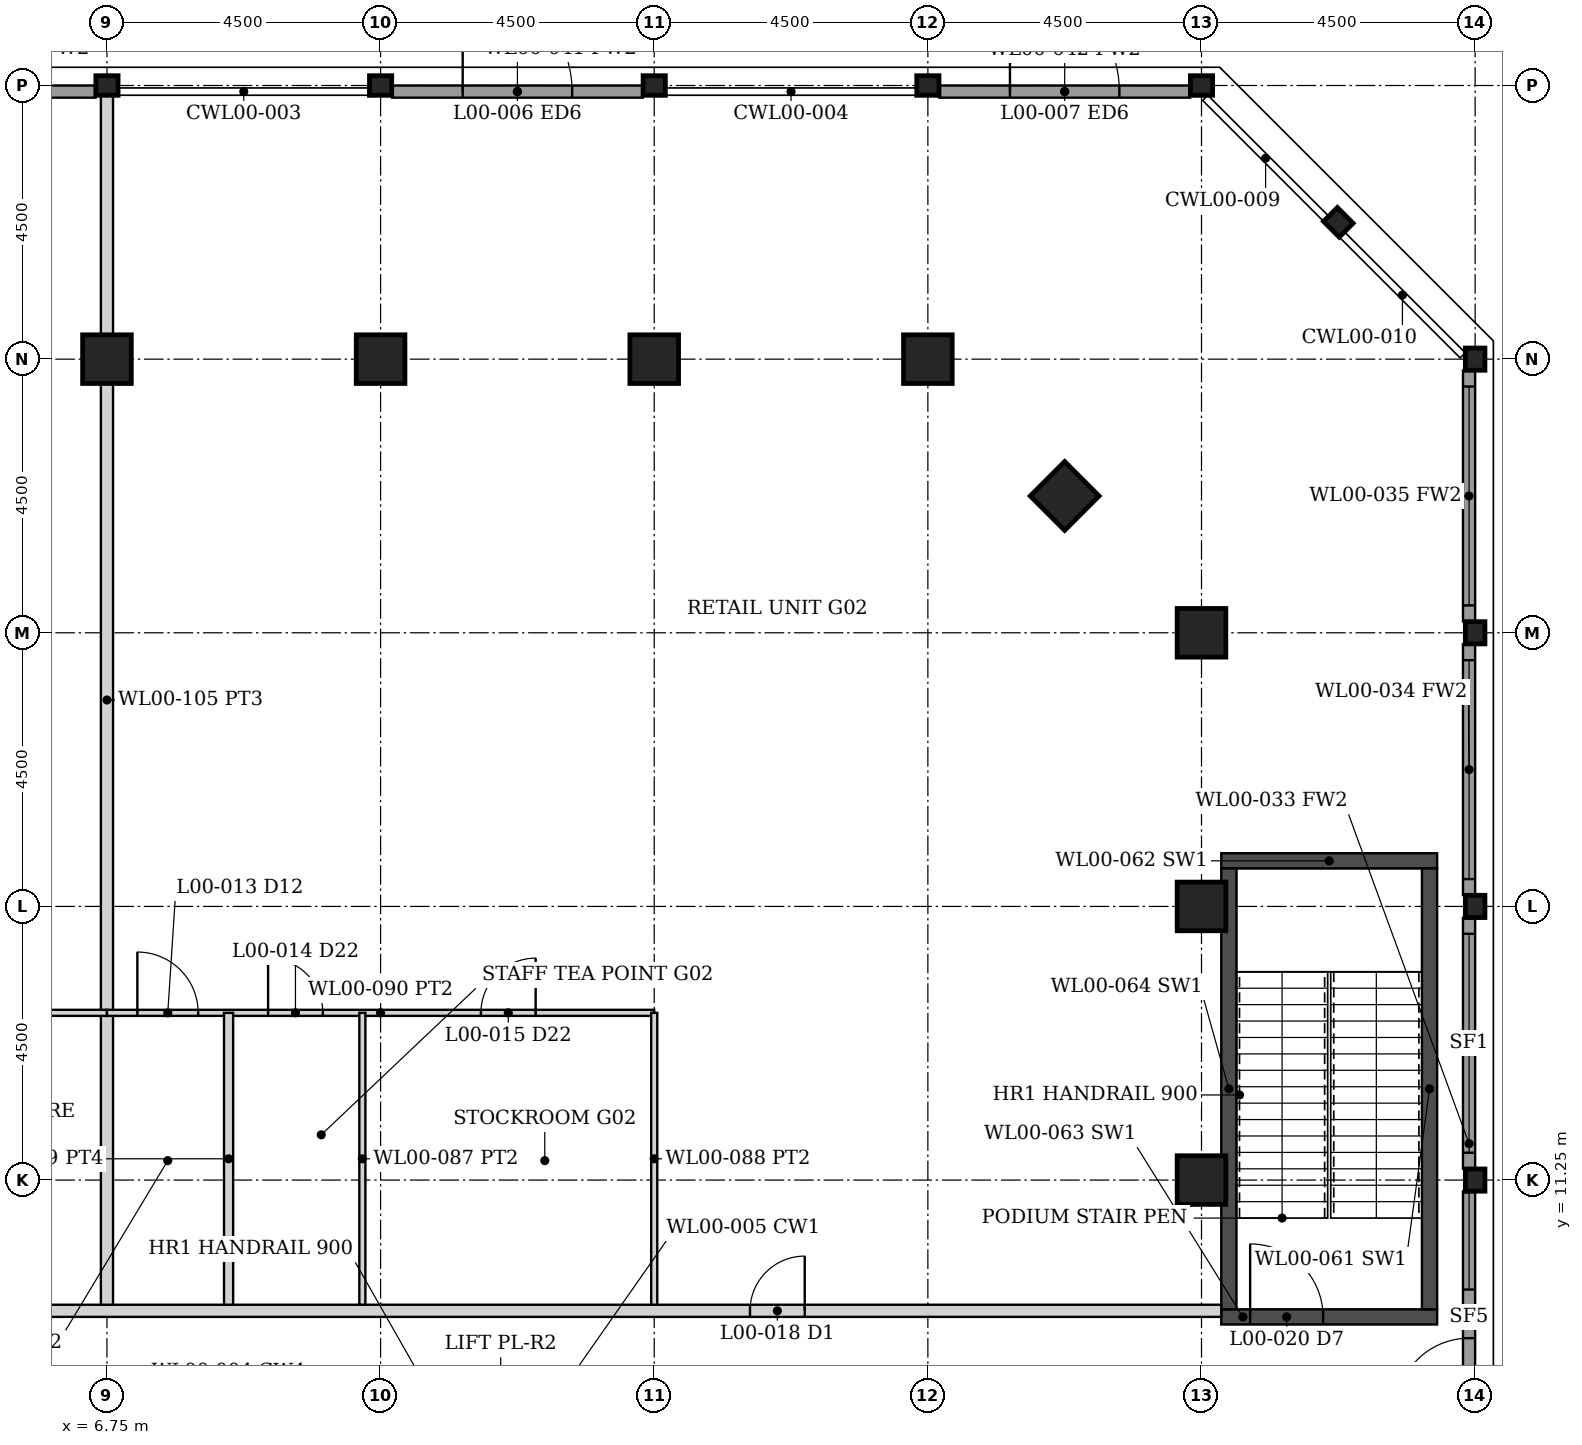
"""IFC4 building model, lengths in metres.
Left out: names, types, materials, properties, quantities, classifications, styles, units other than length and angle.
Written with IfcOpenShell. Run it as: python <this file> out.ifc"""

import sys

from ifc_helpers import new_model, si_unit, direction, frame, frame_2d, origin, origin_2d, place, context, subcontext, project, spatial, rectangle, hollow_rectangle, i_section, extrude, element, fill, save


model = new_model("IFC4")
c1 = context("Model", 3, precision=1e-05, world=origin(), true_north=direction((0.0, 1.0)))
c2 = subcontext(c1, "Body", "Model", "MODEL_VIEW")
j1 = project(units=[si_unit("LENGTHUNIT", "METRE"), si_unit("PLANEANGLEUNIT", "RADIAN")], contexts=[c1])
p1 = place(None, origin())
s1 = spatial("IfcSite", under=j1, at=p1, CompositionType="ELEMENT")
p2 = place(p1, origin())
s2 = spatial("IfcBuilding", under=s1, at=p2, CompositionType="ELEMENT")
p3 = place(p2, origin())
s3 = spatial("IfcBuildingStorey", under=s2, at=p3, CompositionType="ELEMENT", Elevation=0.0)
for number, where, z_axis, x_axis in (
    (1, (6.75, 24.75, -0.3), (0.0, 0.0, 1.0), (0.0, 1.0, 0.0)),
    (2, (11.25, 24.75, -0.3), (0.0, 0.0, 1.0), (0.0, 1.0, 0.0)),
    (3, (24.75, 11.25, -0.3), (0.0, 0.0, 1.0), (1.0, 0.0, 0.0)),
    (4, (15.75, 24.75, -0.3), (0.0, 0.0, 1.0), (0.0, 1.0, 0.0)),
    (5, (24.75, 15.75, -0.3), (0.0, 0.0, 1.0), (1.0, 0.0, 0.0)),
    (6, (20.25, 24.75, -0.3), (0.0, 0.0, 1.0), (0.0, 1.0, 0.0)),
    (7, (24.75, 20.25, -0.3), (0.0, 0.0, 1.0), (1.0, 0.0, 0.0)),
    (8, (22.5, 22.5, -0.3), (0.0, 0.0, 1.0), (0.707, 0.707, 0.0)),
):
    element("IfcColumn", number, at=place(p3, frame(where, z_axis=z_axis, x_axis=x_axis)), inside=s3, PredefinedType="COLUMN", context=c2, shape_type="SweptSolid", body=[
        extrude(hollow_rectangle(XDim=0.8, YDim=0.8, WallThickness=0.08, at=origin_2d()), origin(), (0.0, 0.0, 1.0), 6.3),
    ])
for number, where, z_axis, x_axis in (
    (9, (6.75, 29.25, -0.3), (0.0, 0.0, 1.0), (0.0, 1.0, 0.0)),
    (10, (11.25, 29.25, -0.3), (0.0, 0.0, 1.0), (0.0, 1.0, 0.0)),
    (11, (29.25, 11.25, -0.3), (0.0, 0.0, 1.0), (1.0, 0.0, 0.0)),
    (12, (15.75, 29.25, -0.3), (0.0, 0.0, 1.0), (0.0, 1.0, 0.0)),
    (13, (29.25, 15.75, -0.3), (0.0, 0.0, 1.0), (1.0, 0.0, 0.0)),
    (14, (20.25, 29.25, -0.3), (0.0, 0.0, 1.0), (0.0, 1.0, 0.0)),
    (15, (29.25, 20.25, -0.3), (0.0, 0.0, 1.0), (1.0, 0.0, 0.0)),
    (16, (24.75, 29.25, -0.3), (0.0, 0.0, 1.0), (0.0, 1.0, 0.0)),
    (17, (29.25, 24.75, -0.3), (0.0, 0.0, 1.0), (1.0, 0.0, 0.0)),
    (18, (27.0, 27.0, -0.3), (0.0, 0.0, 1.0), (0.707, 0.707, 0.0)),
):
    element("IfcColumn", number, at=place(p3, frame(where, z_axis=z_axis, x_axis=x_axis)), inside=s3, PredefinedType="COLUMN", context=c2, shape_type="SweptSolid", body=[
        extrude(i_section(OverallWidth=0.322, OverallDepth=0.365, WebThickness=0.027, FlangeThickness=0.044, FilletRadius=0.015, at=origin_2d()), origin(), (0.0, 0.0, 1.0), 6.3),
    ])
p4 = place(p3, frame((25.075, 9.0, 0.0), z_axis=(0.0, 0.0, 1.0), x_axis=(1.0, 0.0, 0.0)))
e19 = element("IfcWall", 19, at=p4, inside=s3, PredefinedType="SHEAR", context=c2, shape_type="SweptSolid", body=[
    extrude(rectangle(XDim=3.55, YDim=0.25, at=frame_2d((1.775, 0.0))), origin(), (0.0, 0.0, 1.0), 6.0),
])
p5 = place(p4, frame((0.475, 0.0, 0.0)))
e20 = element("IfcOpeningElement", 20, at=p5, cuts=e19, PredefinedType="OPENING", context=c2, shape_type="SweptSolid", body=[
    extrude(rectangle(XDim=1.2, YDim=2.1, at=frame_2d((0.6, 1.05))), frame((0.0, 0.135, 0.0), z_axis=(0.0, -1.0, 0.0), x_axis=(1.0, 0.0, 0.0)), (0.0, 0.0, 1.0), 0.27),
])
p6 = place(p3, frame((25.075, 16.5, 0.0), z_axis=(0.0, 0.0, 1.0), x_axis=(1.0, 0.0, 0.0)))
e21 = element("IfcWall", 21, at=p6, inside=s3, PredefinedType="SHEAR", context=c2, shape_type="SweptSolid", body=[
    extrude(rectangle(XDim=3.55, YDim=0.25, at=frame_2d((1.775, 0.0))), origin(), (0.0, 0.0, 1.0), 6.0),
])
for number, where, z_axis, x_axis in (
    (22, (25.2, 9.125, 0.0), (0.0, 0.0, 1.0), (0.0, 1.0, 0.0)),
    (23, (28.5, 9.125, 0.0), (0.0, 0.0, 1.0), (0.0, 1.0, 0.0)),
):
    element("IfcWall", number, at=place(p3, frame(where, z_axis=z_axis, x_axis=x_axis)), inside=s3, PredefinedType="SHEAR", context=c2, shape_type="SweptSolid", body=[
        extrude(rectangle(XDim=7.25, YDim=0.25, at=frame_2d((3.625, 0.0))), origin(), (0.0, 0.0, 1.0), 6.0),
    ])
p7 = place(p3, frame((29.15, 6.938, 0.0), z_axis=(0.0, 0.0, 1.0), x_axis=(0.0, 1.0, 0.0)))
e24 = element("IfcWall", 24, at=p7, inside=s3, PredefinedType="SOLIDWALL", context=c2, shape_type="SweptSolid", body=[
    extrude(rectangle(XDim=4.125, YDim=0.2, at=frame_2d((2.062, 0.0))), origin(), (0.0, 0.0, 1.0), 5.133),
])
p8 = place(p7, frame((0.512, 0.0, 0.0)))
e25 = element("IfcOpeningElement", 25, at=p8, cuts=e24, PredefinedType="OPENING", context=c2, shape_type="SweptSolid", body=[
    extrude(rectangle(XDim=1.2, YDim=2.4, at=frame_2d((0.6, 1.2))), frame((0.0, 0.11, 0.0), z_axis=(0.0, -1.0, 0.0), x_axis=(1.0, 0.0, 0.0)), (0.0, 0.0, 1.0), 0.22),
])
p9 = place(p7, frame((2.512, 0.0, 0.15)))
e26 = element("IfcOpeningElement", 26, at=p9, cuts=e24, PredefinedType="OPENING", context=c2, shape_type="SweptSolid", body=[
    extrude(rectangle(XDim=1.6, YDim=4.833, at=frame_2d((0.8, 2.417))), frame((0.0, 0.11, 0.0), z_axis=(0.0, -1.0, 0.0), x_axis=(1.0, 0.0, 0.0)), (0.0, 0.0, 1.0), 0.22),
])
p10 = place(p3, frame((29.15, 11.438, 0.0), z_axis=(0.0, 0.0, 1.0), x_axis=(0.0, 1.0, 0.0)))
e27 = element("IfcWall", 27, at=p10, inside=s3, PredefinedType="SOLIDWALL", context=c2, shape_type="SweptSolid", body=[
    extrude(rectangle(XDim=4.125, YDim=0.2, at=frame_2d((2.062, 0.0))), origin(), (0.0, 0.0, 1.0), 5.133),
])
p11 = place(p10, frame((0.262, 0.0, 0.15)))
e28 = element("IfcOpeningElement", 28, at=p11, cuts=e27, PredefinedType="OPENING", context=c2, shape_type="SweptSolid", body=[
    extrude(rectangle(XDim=3.6, YDim=4.833, at=frame_2d((1.8, 2.417))), frame((0.0, 0.11, 0.0), z_axis=(0.0, -1.0, 0.0), x_axis=(1.0, 0.0, 0.0)), (0.0, 0.0, 1.0), 0.22),
])
p12 = place(p3, frame((29.15, 15.938, 0.0), z_axis=(0.0, 0.0, 1.0), x_axis=(0.0, 1.0, 0.0)))
e29 = element("IfcWall", 29, at=p12, inside=s3, PredefinedType="SOLIDWALL", context=c2, shape_type="SweptSolid", body=[
    extrude(rectangle(XDim=4.125, YDim=0.2, at=frame_2d((2.062, 0.0))), origin(), (0.0, 0.0, 1.0), 5.133),
])
p13 = place(p12, frame((0.262, 0.0, 0.15)))
e30 = element("IfcOpeningElement", 30, at=p13, cuts=e29, PredefinedType="OPENING", context=c2, shape_type="SweptSolid", body=[
    extrude(rectangle(XDim=3.6, YDim=4.833, at=frame_2d((1.8, 2.417))), frame((0.0, 0.11, 0.0), z_axis=(0.0, -1.0, 0.0), x_axis=(1.0, 0.0, 0.0)), (0.0, 0.0, 1.0), 0.22),
])
p14 = place(p3, frame((29.15, 20.438, 0.0), z_axis=(0.0, 0.0, 1.0), x_axis=(0.0, 1.0, 0.0)))
e31 = element("IfcWall", 31, at=p14, inside=s3, PredefinedType="SOLIDWALL", context=c2, shape_type="SweptSolid", body=[
    extrude(rectangle(XDim=4.125, YDim=0.2, at=frame_2d((2.062, 0.0))), origin(), (0.0, 0.0, 1.0), 5.133),
])
p15 = place(p14, frame((0.262, 0.0, 0.15)))
e32 = element("IfcOpeningElement", 32, at=p15, cuts=e31, PredefinedType="OPENING", context=c2, shape_type="SweptSolid", body=[
    extrude(rectangle(XDim=3.6, YDim=4.833, at=frame_2d((1.8, 2.417))), frame((0.0, 0.11, 0.0), z_axis=(0.0, -1.0, 0.0), x_axis=(1.0, 0.0, 0.0)), (0.0, 0.0, 1.0), 0.22),
])
p16 = place(p3, frame((2.438, 29.15, 0.0), z_axis=(0.0, 0.0, 1.0), x_axis=(1.0, 0.0, 0.0)))
e33 = element("IfcWall", 33, at=p16, inside=s3, PredefinedType="SOLIDWALL", context=c2, shape_type="SweptSolid", body=[
    extrude(rectangle(XDim=4.125, YDim=0.2, at=frame_2d((2.062, 0.0))), origin(), (0.0, 0.0, 1.0), 5.133),
])
p17 = place(p16, frame((1.162, 0.0, 0.0)))
e34 = element("IfcOpeningElement", 34, at=p17, cuts=e33, PredefinedType="OPENING", context=c2, shape_type="SweptSolid", body=[
    extrude(rectangle(XDim=1.8, YDim=2.7, at=frame_2d((0.9, 1.35))), frame((0.0, 0.11, 0.0), z_axis=(0.0, -1.0, 0.0), x_axis=(1.0, 0.0, 0.0)), (0.0, 0.0, 1.0), 0.22),
])
p18 = place(p3, frame((11.438, 29.15, 0.0), z_axis=(0.0, 0.0, 1.0), x_axis=(1.0, 0.0, 0.0)))
e35 = element("IfcWall", 35, at=p18, inside=s3, PredefinedType="SOLIDWALL", context=c2, shape_type="SweptSolid", body=[
    extrude(rectangle(XDim=4.125, YDim=0.2, at=frame_2d((2.062, 0.0))), origin(), (0.0, 0.0, 1.0), 5.133),
])
p19 = place(p18, frame((1.162, 0.0, 0.0)))
e36 = element("IfcOpeningElement", 36, at=p19, cuts=e35, PredefinedType="OPENING", context=c2, shape_type="SweptSolid", body=[
    extrude(rectangle(XDim=1.8, YDim=2.7, at=frame_2d((0.9, 1.35))), frame((0.0, 0.11, 0.0), z_axis=(0.0, -1.0, 0.0), x_axis=(1.0, 0.0, 0.0)), (0.0, 0.0, 1.0), 0.22),
])
p20 = place(p3, frame((20.438, 29.15, 0.0), z_axis=(0.0, 0.0, 1.0), x_axis=(1.0, 0.0, 0.0)))
e37 = element("IfcWall", 37, at=p20, inside=s3, PredefinedType="SOLIDWALL", context=c2, shape_type="SweptSolid", body=[
    extrude(rectangle(XDim=4.125, YDim=0.2, at=frame_2d((2.062, 0.0))), origin(), (0.0, 0.0, 1.0), 5.133),
])
p21 = place(p20, frame((1.162, 0.0, 0.0)))
e38 = element("IfcOpeningElement", 38, at=p21, cuts=e37, PredefinedType="OPENING", context=c2, shape_type="SweptSolid", body=[
    extrude(rectangle(XDim=1.8, YDim=2.7, at=frame_2d((0.9, 1.35))), frame((0.0, 0.11, 0.0), z_axis=(0.0, -1.0, 0.0), x_axis=(1.0, 0.0, 0.0)), (0.0, 0.0, 1.0), 0.22),
])
p22 = place(p3, frame((-25.075, 9.1, 0.0), z_axis=(0.0, 0.0, 1.0), x_axis=(1.0, 0.0, 0.0)))
e39 = element("IfcWall", 39, at=p22, inside=s3, PredefinedType="PARTITIONING", context=c2, shape_type="SweptSolid", body=[
    extrude(rectangle(XDim=50.15, YDim=0.2, at=frame_2d((25.075, 0.0))), origin(), (0.0, 0.0, 1.0), 4.829),
])
p23 = place(p22, frame((6.85, 0.0, 0.0)))
e40 = element("IfcOpeningElement", 40, at=p23, cuts=e39, PredefinedType="OPENING", context=c2, shape_type="SweptSolid", body=[
    extrude(rectangle(XDim=0.9, YDim=2.1, at=frame_2d((0.45, 1.05))), frame((0.0, 0.11, 0.0), z_axis=(0.0, -1.0, 0.0), x_axis=(1.0, 0.0, 0.0)), (0.0, 0.0, 1.0), 0.22),
])
p24 = place(p22, frame((24.625, 0.0, 0.0)))
e41 = element("IfcOpeningElement", 41, at=p24, cuts=e39, PredefinedType="OPENING", context=c2, shape_type="SweptSolid", body=[
    extrude(rectangle(XDim=0.9, YDim=2.1, at=frame_2d((0.45, 1.05))), frame((0.0, 0.11, 0.0), z_axis=(0.0, -1.0, 0.0), x_axis=(1.0, 0.0, 0.0)), (0.0, 0.0, 1.0), 0.22),
])
p25 = place(p22, frame((42.4, 0.0, 0.0)))
e42 = element("IfcOpeningElement", 42, at=p25, cuts=e39, PredefinedType="OPENING", context=c2, shape_type="SweptSolid", body=[
    extrude(rectangle(XDim=0.9, YDim=2.1, at=frame_2d((0.45, 1.05))), frame((0.0, 0.11, 0.0), z_axis=(0.0, -1.0, 0.0), x_axis=(1.0, 0.0, 0.0)), (0.0, 0.0, 1.0), 0.22),
])
p26 = place(p3, frame((6.75, 9.2, 0.0), z_axis=(0.0, 0.0, 1.0), x_axis=(0.0, 1.0, 0.0)))
e43 = element("IfcWall", 43, at=p26, inside=s3, PredefinedType="PARTITIONING", context=c2, shape_type="SweptSolid", body=[
    extrude(rectangle(XDim=19.889, YDim=0.2, at=frame_2d((9.944, 0.0))), origin(), (0.0, 0.0, 1.0), 4.829),
])
p27 = place(p3, frame((2.25, 14.0, 0.0), z_axis=(0.0, 0.0, 1.0), x_axis=(1.0, 0.0, 0.0)))
e44 = element("IfcWall", 44, at=p27, inside=s3, PredefinedType="PARTITIONING", context=c2, shape_type="SweptSolid", body=[
    extrude(rectangle(XDim=4.5, YDim=0.1, at=frame_2d((2.25, 0.0))), origin(), (0.0, 0.0, 1.0), 4.829),
])
p28 = place(p27, frame((1.8, 0.0, 0.0)))
e45 = element("IfcOpeningElement", 45, at=p28, cuts=e44, PredefinedType="OPENING", context=c2, shape_type="SweptSolid", body=[
    extrude(rectangle(XDim=0.9, YDim=2.1, at=frame_2d((0.45, 1.05))), frame((0.0, 0.06, 0.0), z_axis=(0.0, -1.0, 0.0), x_axis=(1.0, 0.0, 0.0)), (0.0, 0.0, 1.0), 0.12),
])
p29 = place(p3, frame((6.75, 14.0, 0.0), z_axis=(0.0, 0.0, 1.0), x_axis=(1.0, 0.0, 0.0)))
e46 = element("IfcWall", 46, at=p29, inside=s3, PredefinedType="PARTITIONING", context=c2, shape_type="SweptSolid", body=[
    extrude(rectangle(XDim=9.0, YDim=0.1, at=frame_2d((4.5, 0.0))), origin(), (0.0, 0.0, 1.0), 4.829),
])
p30 = place(p29, frame((6.15, 0.0, 0.0)))
e47 = element("IfcOpeningElement", 47, at=p30, cuts=e46, PredefinedType="OPENING", context=c2, shape_type="SweptSolid", body=[
    extrude(rectangle(XDim=0.9, YDim=2.1, at=frame_2d((0.45, 1.05))), frame((0.0, 0.06, 0.0), z_axis=(0.0, -1.0, 0.0), x_axis=(1.0, 0.0, 0.0)), (0.0, 0.0, 1.0), 0.12),
])
p31 = place(p29, frame((2.65, 0.0, 0.0)))
e48 = element("IfcOpeningElement", 48, at=p31, cuts=e46, PredefinedType="OPENING", context=c2, shape_type="SweptSolid", body=[
    extrude(rectangle(XDim=0.9, YDim=2.1, at=frame_2d((0.45, 1.05))), frame((0.0, 0.06, 0.0), z_axis=(0.0, -1.0, 0.0), x_axis=(1.0, 0.0, 0.0)), (0.0, 0.0, 1.0), 0.12),
])
p32 = place(p29, frame((0.5, 0.0, 0.0)))
e49 = element("IfcOpeningElement", 49, at=p32, cuts=e46, PredefinedType="OPENING", context=c2, shape_type="SweptSolid", body=[
    extrude(rectangle(XDim=1.0, YDim=2.1, at=frame_2d((0.5, 1.05))), frame((0.0, 0.06, 0.0), z_axis=(0.0, -1.0, 0.0), x_axis=(1.0, 0.0, 0.0)), (0.0, 0.0, 1.0), 0.12),
])
p33 = place(p3, frame((8.75, 9.2, 0.0), z_axis=(0.0, 0.0, 1.0), x_axis=(0.0, 1.0, 0.0)))
e50 = element("IfcWall", 50, at=p33, inside=s3, PredefinedType="PARTITIONING", context=c2, shape_type="SweptSolid", body=[
    extrude(rectangle(XDim=4.8, YDim=0.15, at=frame_2d((2.4, 0.0))), origin(), (0.0, 0.0, 1.0), 4.829),
])
for number, where, z_axis, x_axis in (
    (51, (10.95, 9.2, 0.0), (0.0, 0.0, 1.0), (0.0, 1.0, 0.0)),
    (52, (15.75, 9.2, 0.0), (0.0, 0.0, 1.0), (0.0, 1.0, 0.0)),
):
    element("IfcWall", number, at=place(p3, frame(where, z_axis=z_axis, x_axis=x_axis)), inside=s3, PredefinedType="PARTITIONING", context=c2, shape_type="SweptSolid", body=[
        extrude(rectangle(XDim=4.8, YDim=0.1, at=frame_2d((2.4, 0.0))), origin(), (0.0, 0.0, 1.0), 4.829),
    ])
p34 = place(p8, origin())
e53 = element("IfcDoor", 53, at=p34, inside=s3, OperationType="SINGLE_SWING_LEFT", PredefinedType="DOOR", context=c2, shape_type="SweptSolid", body=[
    extrude(rectangle(XDim=1.2, YDim=2.4, at=frame_2d((0.6, 1.2))), frame((0.0, 0.025, 0.0), z_axis=(0.0, -1.0, 0.0), x_axis=(1.0, 0.0, 0.0)), (0.0, 0.0, 1.0), 0.05),
])
fill(e25, e53)
p35 = place(p9, origin())
e54 = element("IfcWindow", 54, at=p35, inside=s3, PartitioningType="SINGLE_PANEL", PredefinedType="WINDOW", context=c2, shape_type="SweptSolid", body=[
    extrude(rectangle(XDim=1.6, YDim=4.833, at=frame_2d((0.8, 2.417))), frame((0.0, 0.03, 0.0), z_axis=(0.0, -1.0, 0.0), x_axis=(1.0, 0.0, 0.0)), (0.0, 0.0, 1.0), 0.06),
])
fill(e26, e54)
p36 = place(p11, origin())
e55 = element("IfcWindow", 55, at=p36, inside=s3, PartitioningType="SINGLE_PANEL", PredefinedType="WINDOW", context=c2, shape_type="SweptSolid", body=[
    extrude(rectangle(XDim=3.6, YDim=4.833, at=frame_2d((1.8, 2.417))), frame((0.0, 0.03, 0.0), z_axis=(0.0, -1.0, 0.0), x_axis=(1.0, 0.0, 0.0)), (0.0, 0.0, 1.0), 0.06),
])
fill(e28, e55)
p37 = place(p13, origin())
e56 = element("IfcWindow", 56, at=p37, inside=s3, PartitioningType="SINGLE_PANEL", PredefinedType="WINDOW", context=c2, shape_type="SweptSolid", body=[
    extrude(rectangle(XDim=3.6, YDim=4.833, at=frame_2d((1.8, 2.417))), frame((0.0, 0.03, 0.0), z_axis=(0.0, -1.0, 0.0), x_axis=(1.0, 0.0, 0.0)), (0.0, 0.0, 1.0), 0.06),
])
fill(e30, e56)
p38 = place(p15, origin())
e57 = element("IfcWindow", 57, at=p38, inside=s3, PartitioningType="SINGLE_PANEL", PredefinedType="WINDOW", context=c2, shape_type="SweptSolid", body=[
    extrude(rectangle(XDim=3.6, YDim=4.833, at=frame_2d((1.8, 2.417))), frame((0.0, 0.03, 0.0), z_axis=(0.0, -1.0, 0.0), x_axis=(1.0, 0.0, 0.0)), (0.0, 0.0, 1.0), 0.06),
])
fill(e32, e57)
p39 = place(p19, origin())
e58 = element("IfcDoor", 58, at=p39, inside=s3, OperationType="DOUBLE_DOOR_SINGLE_SWING", PredefinedType="DOOR", context=c2, shape_type="SweptSolid", body=[
    extrude(rectangle(XDim=1.8, YDim=2.7, at=frame_2d((0.9, 1.35))), frame((0.0, 0.025, 0.0), z_axis=(0.0, -1.0, 0.0), x_axis=(1.0, 0.0, 0.0)), (0.0, 0.0, 1.0), 0.05),
])
fill(e36, e58)
p40 = place(p21, origin())
e59 = element("IfcDoor", 59, at=p40, inside=s3, OperationType="DOUBLE_DOOR_SINGLE_SWING", PredefinedType="DOOR", context=c2, shape_type="SweptSolid", body=[
    extrude(rectangle(XDim=1.8, YDim=2.7, at=frame_2d((0.9, 1.35))), frame((0.0, 0.025, 0.0), z_axis=(0.0, -1.0, 0.0), x_axis=(1.0, 0.0, 0.0)), (0.0, 0.0, 1.0), 0.05),
])
fill(e38, e59)
p41 = place(p30, origin())
e60 = element("IfcDoor", 60, at=p41, inside=s3, OperationType="SINGLE_SWING_RIGHT", PredefinedType="DOOR", context=c2, shape_type="SweptSolid", body=[
    extrude(rectangle(XDim=0.9, YDim=2.1, at=frame_2d((0.45, 1.05))), frame((0.0, 0.025, 0.0), z_axis=(0.0, -1.0, 0.0), x_axis=(1.0, 0.0, 0.0)), (0.0, 0.0, 1.0), 0.05),
])
fill(e47, e60)
p42 = place(p31, origin())
e61 = element("IfcDoor", 61, at=p42, inside=s3, OperationType="SINGLE_SWING_LEFT", PredefinedType="DOOR", context=c2, shape_type="SweptSolid", body=[
    extrude(rectangle(XDim=0.9, YDim=2.1, at=frame_2d((0.45, 1.05))), frame((0.0, 0.025, 0.0), z_axis=(0.0, -1.0, 0.0), x_axis=(1.0, 0.0, 0.0)), (0.0, 0.0, 1.0), 0.05),
])
fill(e48, e61)
p43 = place(p32, origin())
e62 = element("IfcDoor", 62, at=p43, inside=s3, OperationType="SINGLE_SWING_LEFT", PredefinedType="DOOR", context=c2, shape_type="SweptSolid", body=[
    extrude(rectangle(XDim=1.0, YDim=2.1, at=frame_2d((0.5, 1.05))), frame((0.0, 0.025, 0.0), z_axis=(0.0, -1.0, 0.0), x_axis=(1.0, 0.0, 0.0)), (0.0, 0.0, 1.0), 0.05),
])
fill(e49, e62)
p44 = place(p25, origin())
e63 = element("IfcDoor", 63, at=p44, inside=s3, OperationType="SINGLE_SWING_RIGHT", PredefinedType="DOOR", context=c2, shape_type="SweptSolid", body=[
    extrude(rectangle(XDim=0.9, YDim=2.1, at=frame_2d((0.45, 1.05))), frame((0.0, 0.025, 0.0), z_axis=(0.0, -1.0, 0.0), x_axis=(1.0, 0.0, 0.0)), (0.0, 0.0, 1.0), 0.05),
])
fill(e42, e63)
p45 = place(p5, origin())
e64 = element("IfcDoor", 64, at=p45, inside=s3, OperationType="SINGLE_SWING_LEFT", PredefinedType="DOOR", context=c2, shape_type="SweptSolid", body=[
    extrude(rectangle(XDim=1.2, YDim=2.1, at=frame_2d((0.6, 1.05))), frame((0.0, 0.025, 0.0), z_axis=(0.0, -1.0, 0.0), x_axis=(1.0, 0.0, 0.0)), (0.0, 0.0, 1.0), 0.05),
])
fill(e20, e64)
save(model, sys.argv[1])
